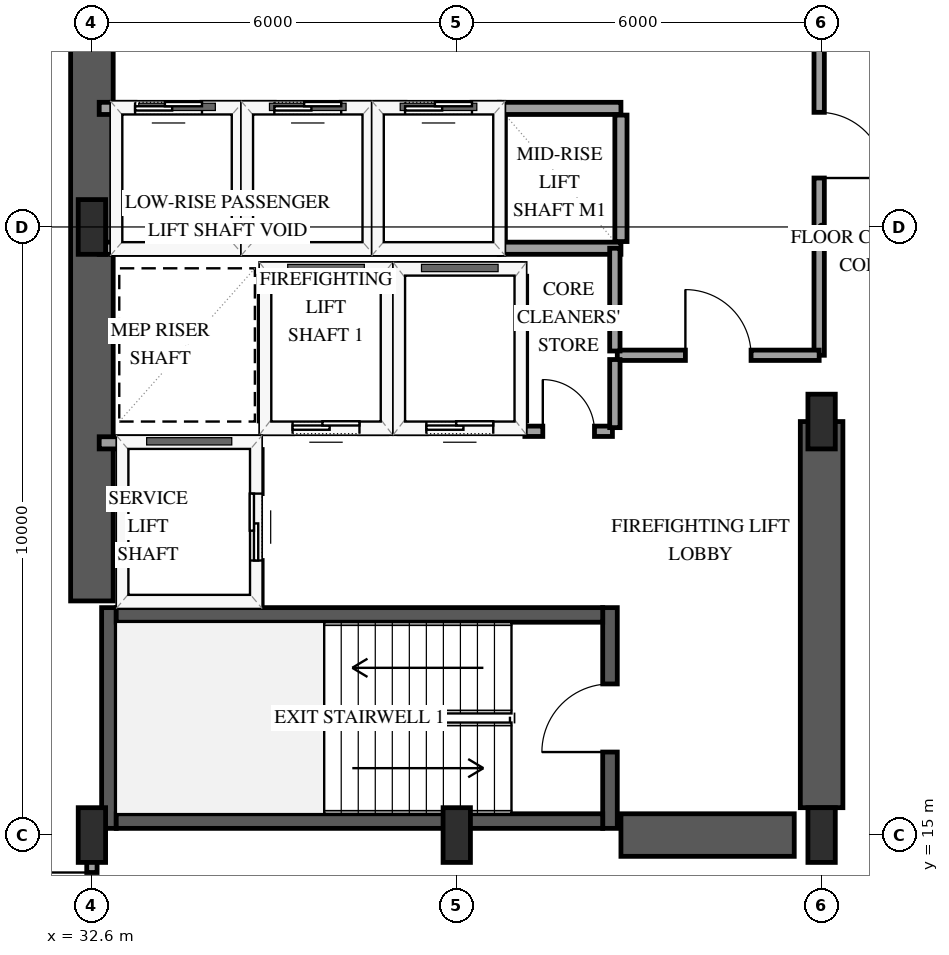
"""IFC4 building model, lengths in metres.
Left out: names, types, materials, properties, quantities, classifications, styles, units other than length and angle.
Written with IfcOpenShell. Run it as: python <this file> out.ifc"""

import sys

from ifc_helpers import new_model, si_unit, direction, frame, frame_2d, origin, origin_2d, place, context, subcontext, project, spatial, rectangle, extrude, element, fill, save


model = new_model("IFC4")
c1 = context("Model", 3, precision=1e-05, world=origin(), true_north=direction((0.0, 1.0)))
c2 = subcontext(c1, "Body", "Model", "MODEL_VIEW")
j1 = project(units=[si_unit("LENGTHUNIT", "METRE"), si_unit("PLANEANGLEUNIT", "RADIAN")], contexts=[c1])
p1 = place(None, origin())
s1 = spatial("IfcSite", under=j1, at=p1, CompositionType="ELEMENT")
p2 = place(p1, origin())
s2 = spatial("IfcBuilding", under=s1, at=p2, CompositionType="ELEMENT")
p3 = place(p2, frame((0.0, 0.0, 30.6)))
s3 = spatial("IfcBuildingStorey", under=s2, at=p3, CompositionType="ELEMENT", Elevation=30.6)
p4 = place(p3, frame((32.88, 15.11, 0.0), z_axis=(0.0, 0.0, 1.0), x_axis=(0.0, 1.0, 0.0)))
e1 = element("IfcWall", 1, at=p4, inside=s3, PredefinedType="SHEAR", context=c2, shape_type="SweptSolid", body=[
    extrude(rectangle(XDim=3.63, YDim=0.24, at=frame_2d((1.815, 0.0))), origin(), (0.0, 0.0, 1.0), 4.0),
])
p5 = place(p3, frame((41.12, 15.11, 0.0), z_axis=(0.0, 0.0, 1.0), x_axis=(0.0, 1.0, 0.0)))
e2 = element("IfcWall", 2, at=p5, inside=s3, PredefinedType="SHEAR", context=c2, shape_type="SweptSolid", body=[
    extrude(rectangle(XDim=3.63, YDim=0.24, at=frame_2d((1.815, 0.0))), origin(), (0.0, 0.0, 1.0), 4.0),
])
p6 = place(p5, frame((1.255, 0.0, 0.0)))
e3 = element("IfcOpeningElement", 3, at=p6, cuts=e2, PredefinedType="OPENING", context=c2, shape_type="SweptSolid", body=[
    extrude(rectangle(XDim=1.12, YDim=2.15, at=frame_2d((0.56, 1.075))), frame((0.0, 0.13, 0.0), z_axis=(0.0, -1.0, 0.0), x_axis=(1.0, 0.0, 0.0)), (0.0, 0.0, 1.0), 0.26),
])
for number, where, z_axis, x_axis in (
    (4, (33.0, 15.23, 0.0), (0.0, 0.0, 1.0), (1.0, 0.0, 0.0)),
    (5, (33.0, 18.62, 0.0), (0.0, 0.0, 1.0), (1.0, 0.0, 0.0)),
):
    element("IfcWall", number, at=place(p3, frame(where, z_axis=z_axis, x_axis=x_axis)), inside=s3, PredefinedType="SHEAR", context=c2, shape_type="SweptSolid", body=[
        extrude(rectangle(XDim=8.0, YDim=0.24, at=frame_2d((4.0, 0.0))), origin(), (0.0, 0.0, 1.0), 4.0),
    ])
p7 = place(p3, frame((32.6, 18.85, 0.0), z_axis=(0.0, 0.0, 1.0), x_axis=(0.0, 1.0, 0.0)))
e6 = element("IfcWall", 6, at=p7, inside=s3, PredefinedType="SHEAR", context=c2, shape_type="SweptSolid", body=[
    extrude(rectangle(XDim=12.3, YDim=0.7, at=frame_2d((6.15, 0.0))), origin(), (0.0, 0.0, 1.0), 4.0),
])
p8 = place(p3, frame((41.3, 15.0, 0.0), z_axis=(0.0, 0.0, 1.0), x_axis=(1.0, 0.0, 0.0)))
e7 = element("IfcWall", 7, at=p8, inside=s3, PredefinedType="SHEAR", context=c2, shape_type="SweptSolid", body=[
    extrude(rectangle(XDim=2.85, YDim=0.7, at=frame_2d((1.425, 0.0))), origin(), (0.0, 0.0, 1.0), 4.0),
])
p9 = place(p3, frame((44.6, 15.45, 0.0), z_axis=(0.0, 0.0, 1.0), x_axis=(0.0, 1.0, 0.0)))
e8 = element("IfcWall", 8, at=p9, inside=s3, PredefinedType="SHEAR", context=c2, shape_type="SweptSolid", body=[
    extrude(rectangle(XDim=6.35, YDim=0.7, at=frame_2d((3.175, 0.0))), origin(), (0.0, 0.0, 1.0), 4.0),
])
for number, where, z_axis, x_axis in (
    (9, (32.6, 15.0, -0.3), (0.0, 0.0, 1.0), (1.0, 0.0, 0.0)),
    (10, (32.6, 25.0, -0.3), (0.0, 0.0, 1.0), (1.0, 0.0, 0.0)),
    (11, (38.6, 15.0, -0.3), (0.0, 0.0, 1.0), (1.0, 0.0, 0.0)),
    (12, (44.6, 15.0, -0.3), (0.0, 0.0, 1.0), (1.0, 0.0, 0.0)),
    (13, (44.6, 21.8, -0.3), (0.0, 0.0, 1.0), (1.0, 0.0, 0.0)),
):
    element("IfcColumn", number, at=place(p3, frame(where, z_axis=z_axis, x_axis=x_axis)), inside=s3, PredefinedType="PILASTER", context=c2, shape_type="SweptSolid", body=[
        extrude(rectangle(XDim=0.45, YDim=0.9, at=origin_2d()), origin(), (0.0, 0.0, 1.0), 4.3),
    ])
p10 = place(p3, frame((35.45, 21.7, 0.0), z_axis=(0.0, 0.0, 1.0), x_axis=(1.0, 0.0, 0.0)))
e14 = element("IfcWall", 14, at=p10, inside=s3, PredefinedType="SOLIDWALL", context=c2, shape_type="SweptSolid", body=[
    extrude(rectangle(XDim=2.0, YDim=0.2, at=frame_2d((1.0, 0.0))), origin(), (0.0, 0.0, 1.0), 3.7),
])
p11 = place(p10, frame((0.45, 0.0, 0.0)))
e15 = element("IfcOpeningElement", 15, at=p11, cuts=e14, PredefinedType="OPENING", context=c2, shape_type="SweptSolid", body=[
    extrude(rectangle(XDim=1.1, YDim=2.15, at=frame_2d((0.55, 1.075))), frame((0.0, 0.11, 0.0), z_axis=(0.0, -1.0, 0.0), x_axis=(1.0, 0.0, 0.0)), (0.0, 0.0, 1.0), 0.22),
])
p12 = place(p3, frame((35.45, 24.3, 0.0), z_axis=(0.0, 0.0, 1.0), x_axis=(1.0, 0.0, 0.0)))
e16 = element("IfcWall", 16, at=p12, inside=s3, PredefinedType="SOLIDWALL", context=c2, shape_type="SweptSolid", body=[
    extrude(rectangle(XDim=2.0, YDim=0.2, at=frame_2d((1.0, 0.0))), origin(), (0.0, 0.0, 1.0), 3.7),
])
for number, where, z_axis, x_axis in (
    (17, (35.45, 21.81, 0.0), (0.0, 0.0, 1.0), (0.0, 1.0, 0.0)),
    (18, (37.45, 21.81, 0.0), (0.0, 0.0, 1.0), (0.0, 1.0, 0.0)),
):
    element("IfcWall", number, at=place(p3, frame(where, z_axis=z_axis, x_axis=x_axis)), inside=s3, PredefinedType="SOLIDWALL", context=c2, shape_type="SweptSolid", body=[
        extrude(rectangle(XDim=2.38, YDim=0.2, at=frame_2d((1.19, 0.0))), origin(), (0.0, 0.0, 1.0), 3.7),
    ])
p13 = place(p3, frame((37.65, 21.7, 0.0), z_axis=(0.0, 0.0, 1.0), x_axis=(1.0, 0.0, 0.0)))
e19 = element("IfcWall", 19, at=p13, inside=s3, PredefinedType="SOLIDWALL", context=c2, shape_type="SweptSolid", body=[
    extrude(rectangle(XDim=2.0, YDim=0.2, at=frame_2d((1.0, 0.0))), origin(), (0.0, 0.0, 1.0), 3.7),
])
p14 = place(p13, frame((0.45, 0.0, 0.0)))
e20 = element("IfcOpeningElement", 20, at=p14, cuts=e19, PredefinedType="OPENING", context=c2, shape_type="SweptSolid", body=[
    extrude(rectangle(XDim=1.1, YDim=2.15, at=frame_2d((0.55, 1.075))), frame((0.0, 0.11, 0.0), z_axis=(0.0, -1.0, 0.0), x_axis=(1.0, 0.0, 0.0)), (0.0, 0.0, 1.0), 0.22),
])
p15 = place(p3, frame((37.65, 24.3, 0.0), z_axis=(0.0, 0.0, 1.0), x_axis=(1.0, 0.0, 0.0)))
e21 = element("IfcWall", 21, at=p15, inside=s3, PredefinedType="SOLIDWALL", context=c2, shape_type="SweptSolid", body=[
    extrude(rectangle(XDim=2.0, YDim=0.2, at=frame_2d((1.0, 0.0))), origin(), (0.0, 0.0, 1.0), 3.7),
])
p16 = place(p3, frame((39.65, 21.81, 0.0), z_axis=(0.0, 0.0, 1.0), x_axis=(0.0, 1.0, 0.0)))
e22 = element("IfcWall", 22, at=p16, inside=s3, PredefinedType="SOLIDWALL", context=c2, shape_type="SweptSolid", body=[
    extrude(rectangle(XDim=2.38, YDim=0.2, at=frame_2d((1.19, 0.0))), origin(), (0.0, 0.0, 1.0), 3.7),
])
p17 = place(p3, frame((32.72, 21.45, 0.0), z_axis=(0.0, 0.0, 1.0), x_axis=(1.0, 0.0, 0.0)))
e23 = element("IfcWall", 23, at=p17, inside=s3, PredefinedType="SOLIDWALL", context=c2, shape_type="SweptSolid", body=[
    extrude(rectangle(XDim=2.58, YDim=0.2, at=frame_2d((1.29, 0.0))), origin(), (0.0, 0.0, 1.0), 3.7),
])
p18 = place(p3, frame((35.3, 18.79, 0.0), z_axis=(0.0, 0.0, 1.0), x_axis=(0.0, 1.0, 0.0)))
e24 = element("IfcWall", 24, at=p18, inside=s3, PredefinedType="SOLIDWALL", context=c2, shape_type="SweptSolid", body=[
    extrude(rectangle(XDim=2.55, YDim=0.2, at=frame_2d((1.275, 0.0))), origin(), (0.0, 0.0, 1.0), 3.7),
])
p19 = place(p18, frame((0.725, 0.0, 0.0)))
e25 = element("IfcOpeningElement", 25, at=p19, cuts=e24, PredefinedType="OPENING", context=c2, shape_type="SweptSolid", body=[
    extrude(rectangle(XDim=1.1, YDim=2.15, at=frame_2d((0.55, 1.075))), frame((0.0, 0.11, 0.0), z_axis=(0.0, -1.0, 0.0), x_axis=(1.0, 0.0, 0.0)), (0.0, 0.0, 1.0), 0.22),
])
p20 = place(p3, frame((32.72, 24.65, 0.0), z_axis=(0.0, 0.0, 1.0), x_axis=(1.0, 0.0, 0.0)))
e26 = element("IfcWall", 26, at=p20, inside=s3, PredefinedType="SOLIDWALL", context=c2, shape_type="SweptSolid", body=[
    extrude(rectangle(XDim=2.28, YDim=0.2, at=frame_2d((1.14, 0.0))), origin(), (0.0, 0.0, 1.0), 3.7),
])
p21 = place(p3, frame((32.72, 26.95, 0.0), z_axis=(0.0, 0.0, 1.0), x_axis=(1.0, 0.0, 0.0)))
e27 = element("IfcWall", 27, at=p21, inside=s3, PredefinedType="SOLIDWALL", context=c2, shape_type="SweptSolid", body=[
    extrude(rectangle(XDim=2.28, YDim=0.2, at=frame_2d((1.14, 0.0))), origin(), (0.0, 0.0, 1.0), 3.7),
])
p22 = place(p21, frame((0.59, 0.0, 0.0)))
e28 = element("IfcOpeningElement", 28, at=p22, cuts=e27, PredefinedType="OPENING", context=c2, shape_type="SweptSolid", body=[
    extrude(rectangle(XDim=1.1, YDim=2.15, at=frame_2d((0.55, 1.075))), frame((0.0, 0.11, 0.0), z_axis=(0.0, -1.0, 0.0), x_axis=(1.0, 0.0, 0.0)), (0.0, 0.0, 1.0), 0.22),
])
p23 = place(p3, frame((35.0, 24.76, 0.0), z_axis=(0.0, 0.0, 1.0), x_axis=(0.0, 1.0, 0.0)))
e29 = element("IfcWall", 29, at=p23, inside=s3, PredefinedType="SOLIDWALL", context=c2, shape_type="SweptSolid", body=[
    extrude(rectangle(XDim=2.08, YDim=0.2, at=frame_2d((1.04, 0.0))), origin(), (0.0, 0.0, 1.0), 3.7),
])
p24 = place(p3, frame((35.15, 24.65, 0.0), z_axis=(0.0, 0.0, 1.0), x_axis=(1.0, 0.0, 0.0)))
e30 = element("IfcWall", 30, at=p24, inside=s3, PredefinedType="SOLIDWALL", context=c2, shape_type="SweptSolid", body=[
    extrude(rectangle(XDim=2.0, YDim=0.2, at=frame_2d((1.0, 0.0))), origin(), (0.0, 0.0, 1.0), 3.7),
])
p25 = place(p3, frame((35.15, 26.95, 0.0), z_axis=(0.0, 0.0, 1.0), x_axis=(1.0, 0.0, 0.0)))
e31 = element("IfcWall", 31, at=p25, inside=s3, PredefinedType="SOLIDWALL", context=c2, shape_type="SweptSolid", body=[
    extrude(rectangle(XDim=2.0, YDim=0.2, at=frame_2d((1.0, 0.0))), origin(), (0.0, 0.0, 1.0), 3.7),
])
p26 = place(p25, frame((0.45, 0.0, 0.0)))
e32 = element("IfcOpeningElement", 32, at=p26, cuts=e31, PredefinedType="OPENING", context=c2, shape_type="SweptSolid", body=[
    extrude(rectangle(XDim=1.1, YDim=2.15, at=frame_2d((0.55, 1.075))), frame((0.0, 0.11, 0.0), z_axis=(0.0, -1.0, 0.0), x_axis=(1.0, 0.0, 0.0)), (0.0, 0.0, 1.0), 0.22),
])
p27 = place(p3, frame((37.15, 24.76, 0.0), z_axis=(0.0, 0.0, 1.0), x_axis=(0.0, 1.0, 0.0)))
e33 = element("IfcWall", 33, at=p27, inside=s3, PredefinedType="SOLIDWALL", context=c2, shape_type="SweptSolid", body=[
    extrude(rectangle(XDim=2.08, YDim=0.2, at=frame_2d((1.04, 0.0))), origin(), (0.0, 0.0, 1.0), 3.7),
])
p28 = place(p3, frame((37.3, 24.65, 0.0), z_axis=(0.0, 0.0, 1.0), x_axis=(1.0, 0.0, 0.0)))
e34 = element("IfcWall", 34, at=p28, inside=s3, PredefinedType="SOLIDWALL", context=c2, shape_type="SweptSolid", body=[
    extrude(rectangle(XDim=2.0, YDim=0.2, at=frame_2d((1.0, 0.0))), origin(), (0.0, 0.0, 1.0), 3.7),
])
p29 = place(p3, frame((37.3, 26.95, 0.0), z_axis=(0.0, 0.0, 1.0), x_axis=(1.0, 0.0, 0.0)))
e35 = element("IfcWall", 35, at=p29, inside=s3, PredefinedType="SOLIDWALL", context=c2, shape_type="SweptSolid", body=[
    extrude(rectangle(XDim=2.0, YDim=0.2, at=frame_2d((1.0, 0.0))), origin(), (0.0, 0.0, 1.0), 3.7),
])
p30 = place(p29, frame((0.45, 0.0, 0.0)))
e36 = element("IfcOpeningElement", 36, at=p30, cuts=e35, PredefinedType="OPENING", context=c2, shape_type="SweptSolid", body=[
    extrude(rectangle(XDim=1.1, YDim=2.15, at=frame_2d((0.55, 1.075))), frame((0.0, 0.11, 0.0), z_axis=(0.0, -1.0, 0.0), x_axis=(1.0, 0.0, 0.0)), (0.0, 0.0, 1.0), 0.22),
])
p31 = place(p3, frame((39.3, 24.76, 0.0), z_axis=(0.0, 0.0, 1.0), x_axis=(0.0, 1.0, 0.0)))
e37 = element("IfcWall", 37, at=p31, inside=s3, PredefinedType="SOLIDWALL", context=c2, shape_type="SweptSolid", body=[
    extrude(rectangle(XDim=2.08, YDim=0.2, at=frame_2d((1.04, 0.0))), origin(), (0.0, 0.0, 1.0), 3.7),
])
for number, where, z_axis, x_axis in (
    (38, (39.3, 24.65, 0.0), (0.0, 0.0, 1.0), (1.0, 0.0, 0.0)),
    (39, (39.3, 26.95, 0.0), (0.0, 0.0, 1.0), (1.0, 0.0, 0.0)),
):
    element("IfcWall", number, at=place(p3, frame(where, z_axis=z_axis, x_axis=x_axis)), inside=s3, PredefinedType="SOLIDWALL", context=c2, shape_type="SweptSolid", body=[
        extrude(rectangle(XDim=2.0, YDim=0.2, at=frame_2d((1.0, 0.0))), origin(), (0.0, 0.0, 1.0), 3.7),
    ])
p32 = place(p3, frame((41.3, 24.76, 0.0), z_axis=(0.0, 0.0, 1.0), x_axis=(0.0, 1.0, 0.0)))
e40 = element("IfcWall", 40, at=p32, inside=s3, PredefinedType="SOLIDWALL", context=c2, shape_type="SweptSolid", body=[
    extrude(rectangle(XDim=2.08, YDim=0.2, at=frame_2d((1.04, 0.0))), origin(), (0.0, 0.0, 1.0), 3.7),
])
p33 = place(p3, frame((44.56, 29.8, 0.0), z_axis=(0.0, 0.0, 1.0), x_axis=(0.0, -1.0, 0.0)))
e41 = element("IfcWall", 41, at=p33, inside=s3, PredefinedType="PARTITIONING", context=c2, shape_type="SweptSolid", body=[
    extrude(rectangle(XDim=6.91, YDim=0.17, at=frame_2d((3.455, 0.0))), origin(), (0.0, 0.0, 1.0), 2.74),
])
p34 = place(p33, frame((2.915, 0.0, 0.0)))
e42 = element("IfcOpeningElement", 42, at=p34, cuts=e41, PredefinedType="OPENING", context=c2, shape_type="SweptSolid", body=[
    extrude(rectangle(XDim=1.08, YDim=2.15, at=frame_2d((0.54, 1.075))), frame((0.0, 0.095, 0.0), z_axis=(0.0, -1.0, 0.0), x_axis=(1.0, 0.0, 0.0)), (0.0, 0.0, 1.0), 0.19),
])
p35 = place(p3, frame((41.24, 22.89, 0.0), z_axis=(0.0, 0.0, 1.0), x_axis=(1.0, 0.0, 0.0)))
e43 = element("IfcWall", 43, at=p35, inside=s3, PredefinedType="PARTITIONING", context=c2, shape_type="SweptSolid", body=[
    extrude(rectangle(XDim=3.32, YDim=0.17, at=frame_2d((1.66, 0.0))), origin(), (0.0, 0.0, 1.0), 3.7),
])
p36 = place(p35, frame((1.12, 0.0, 0.0)))
e44 = element("IfcOpeningElement", 44, at=p36, cuts=e43, PredefinedType="OPENING", context=c2, shape_type="SweptSolid", body=[
    extrude(rectangle(XDim=1.08, YDim=2.15, at=frame_2d((0.54, 1.075))), frame((0.0, 0.095, 0.0), z_axis=(0.0, -1.0, 0.0), x_axis=(1.0, 0.0, 0.0)), (0.0, 0.0, 1.0), 0.19),
])
p37 = place(p3, frame((32.6, 13.02, 0.0), z_axis=(0.0, 0.0, 1.0), x_axis=(0.0, 1.0, 0.0)))
e45 = element("IfcWall", 45, at=p37, inside=s3, PredefinedType="PARTITIONING", context=c2, shape_type="SweptSolid", body=[
    extrude(rectangle(XDim=1.91, YDim=0.17, at=frame_2d((0.955, 0.0))), origin(), (0.0, 0.0, 1.0), 3.7),
])
p38 = place(p37, frame((0.384, 0.0, 0.0)))
e46 = element("IfcOpeningElement", 46, at=p38, cuts=e45, PredefinedType="OPENING", context=c2, shape_type="SweptSolid", body=[
    extrude(rectangle(XDim=0.98, YDim=2.15, at=frame_2d((0.49, 1.075))), frame((0.0, 0.095, 0.0), z_axis=(0.0, -1.0, 0.0), x_axis=(1.0, 0.0, 0.0)), (0.0, 0.0, 1.0), 0.19),
])
p39 = place(p3, frame((41.2, 22.96, 0.0), z_axis=(0.0, 0.0, 1.0), x_axis=(0.0, 1.0, 0.0)))
e47 = element("IfcWall", 47, at=p39, inside=s3, PredefinedType="PARTITIONING", context=c2, shape_type="SweptSolid", body=[
    extrude(rectangle(XDim=1.69, YDim=0.17, at=frame_2d((0.845, 0.0))), origin(), (0.0, 0.0, 1.0), 3.7),
])
p40 = place(p3, frame((39.72, 21.64, 0.0), z_axis=(0.0, 0.0, 1.0), x_axis=(1.0, 0.0, 0.0)))
e48 = element("IfcWall", 48, at=p40, inside=s3, PredefinedType="PARTITIONING", context=c2, shape_type="SweptSolid", body=[
    extrude(rectangle(XDim=1.44, YDim=0.17, at=frame_2d((0.72, 0.0))), origin(), (0.0, 0.0, 1.0), 3.7),
])
p41 = place(p40, frame((0.295, 0.0, 0.0)))
e49 = element("IfcOpeningElement", 49, at=p41, cuts=e48, PredefinedType="OPENING", context=c2, shape_type="SweptSolid", body=[
    extrude(rectangle(XDim=0.85, YDim=2.1, at=frame_2d((0.425, 1.05))), frame((0.0, 0.095, 0.0), z_axis=(0.0, -1.0, 0.0), x_axis=(1.0, 0.0, 0.0)), (0.0, 0.0, 1.0), 0.19),
])
p42 = place(p3, frame((41.2, 21.7, 0.0), z_axis=(0.0, 0.0, 1.0), x_axis=(0.0, 1.0, 0.0)))
e50 = element("IfcWall", 50, at=p42, inside=s3, PredefinedType="PARTITIONING", context=c2, shape_type="SweptSolid", body=[
    extrude(rectangle(XDim=1.12, YDim=0.17, at=frame_2d((0.56, 0.0))), origin(), (0.0, 0.0, 1.0), 3.7),
])
p43 = place(p11, origin())
e51 = element("IfcDoor", 51, at=p43, inside=s3, OperationType="SLIDING_TO_LEFT", PredefinedType="DOOR", context=c2, shape_type="SweptSolid", body=[
    extrude(rectangle(XDim=1.1, YDim=2.15, at=frame_2d((0.55, 1.075))), frame((0.0, 0.025, 0.0), z_axis=(0.0, -1.0, 0.0), x_axis=(1.0, 0.0, 0.0)), (0.0, 0.0, 1.0), 0.05),
])
fill(e15, e51)
p44 = place(p14, origin())
e52 = element("IfcDoor", 52, at=p44, inside=s3, OperationType="SLIDING_TO_LEFT", PredefinedType="DOOR", context=c2, shape_type="SweptSolid", body=[
    extrude(rectangle(XDim=1.1, YDim=2.15, at=frame_2d((0.55, 1.075))), frame((0.0, 0.025, 0.0), z_axis=(0.0, -1.0, 0.0), x_axis=(1.0, 0.0, 0.0)), (0.0, 0.0, 1.0), 0.05),
])
fill(e20, e52)
p45 = place(p19, origin())
e53 = element("IfcDoor", 53, at=p45, inside=s3, OperationType="SLIDING_TO_LEFT", PredefinedType="DOOR", context=c2, shape_type="SweptSolid", body=[
    extrude(rectangle(XDim=1.1, YDim=2.15, at=frame_2d((0.55, 1.075))), frame((0.0, 0.025, 0.0), z_axis=(0.0, -1.0, 0.0), x_axis=(1.0, 0.0, 0.0)), (0.0, 0.0, 1.0), 0.05),
])
fill(e25, e53)
p46 = place(p22, origin())
e54 = element("IfcDoor", 54, at=p46, inside=s3, OperationType="SLIDING_TO_LEFT", PredefinedType="DOOR", context=c2, shape_type="SweptSolid", body=[
    extrude(rectangle(XDim=1.1, YDim=2.15, at=frame_2d((0.55, 1.075))), frame((0.0, 0.025, 0.0), z_axis=(0.0, -1.0, 0.0), x_axis=(1.0, 0.0, 0.0)), (0.0, 0.0, 1.0), 0.05),
])
fill(e28, e54)
p47 = place(p26, origin())
e55 = element("IfcDoor", 55, at=p47, inside=s3, OperationType="SLIDING_TO_LEFT", PredefinedType="DOOR", context=c2, shape_type="SweptSolid", body=[
    extrude(rectangle(XDim=1.1, YDim=2.15, at=frame_2d((0.55, 1.075))), frame((0.0, 0.025, 0.0), z_axis=(0.0, -1.0, 0.0), x_axis=(1.0, 0.0, 0.0)), (0.0, 0.0, 1.0), 0.05),
])
fill(e32, e55)
p48 = place(p30, origin())
e56 = element("IfcDoor", 56, at=p48, inside=s3, OperationType="SLIDING_TO_LEFT", PredefinedType="DOOR", context=c2, shape_type="SweptSolid", body=[
    extrude(rectangle(XDim=1.1, YDim=2.15, at=frame_2d((0.55, 1.075))), frame((0.0, 0.025, 0.0), z_axis=(0.0, -1.0, 0.0), x_axis=(1.0, 0.0, 0.0)), (0.0, 0.0, 1.0), 0.05),
])
fill(e36, e56)
p49 = place(p6, origin())
e57 = element("IfcDoor", 57, at=p49, inside=s3, OperationType="SINGLE_SWING_LEFT", PredefinedType="DOOR", context=c2, shape_type="SweptSolid", body=[
    extrude(rectangle(XDim=1.12, YDim=2.15, at=frame_2d((0.56, 1.075))), frame((0.0, 0.025, 0.0), z_axis=(0.0, -1.0, 0.0), x_axis=(1.0, 0.0, 0.0)), (0.0, 0.0, 1.0), 0.05),
])
fill(e3, e57)
p50 = place(p34, origin())
e58 = element("IfcDoor", 58, at=p50, inside=s3, OperationType="SINGLE_SWING_RIGHT", PredefinedType="DOOR", context=c2, shape_type="SweptSolid", body=[
    extrude(rectangle(XDim=1.08, YDim=2.15, at=frame_2d((0.54, 1.075))), frame((0.0, 0.025, 0.0), z_axis=(0.0, -1.0, 0.0), x_axis=(1.0, 0.0, 0.0)), (0.0, 0.0, 1.0), 0.05),
])
fill(e42, e58)
p51 = place(p36, origin())
e59 = element("IfcDoor", 59, at=p51, inside=s3, OperationType="SINGLE_SWING_LEFT", PredefinedType="DOOR", context=c2, shape_type="SweptSolid", body=[
    extrude(rectangle(XDim=1.08, YDim=2.15, at=frame_2d((0.54, 1.075))), frame((0.0, 0.025, 0.0), z_axis=(0.0, -1.0, 0.0), x_axis=(1.0, 0.0, 0.0)), (0.0, 0.0, 1.0), 0.05),
])
fill(e44, e59)
p52 = place(p38, origin())
e60 = element("IfcDoor", 60, at=p52, inside=s3, OperationType="SINGLE_SWING_RIGHT", PredefinedType="DOOR", context=c2, shape_type="SweptSolid", body=[
    extrude(rectangle(XDim=0.98, YDim=2.15, at=frame_2d((0.49, 1.075))), frame((0.0, 0.025, 0.0), z_axis=(0.0, -1.0, 0.0), x_axis=(1.0, 0.0, 0.0)), (0.0, 0.0, 1.0), 0.05),
])
fill(e46, e60)
p53 = place(p41, origin())
e61 = element("IfcDoor", 61, at=p53, inside=s3, OperationType="SINGLE_SWING_LEFT", PredefinedType="DOOR", context=c2, shape_type="SweptSolid", body=[
    extrude(rectangle(XDim=0.85, YDim=2.1, at=frame_2d((0.425, 1.05))), frame((0.0, 0.025, 0.0), z_axis=(0.0, -1.0, 0.0), x_axis=(1.0, 0.0, 0.0)), (0.0, 0.0, 1.0), 0.05),
])
fill(e49, e61)
save(model, sys.argv[1])
